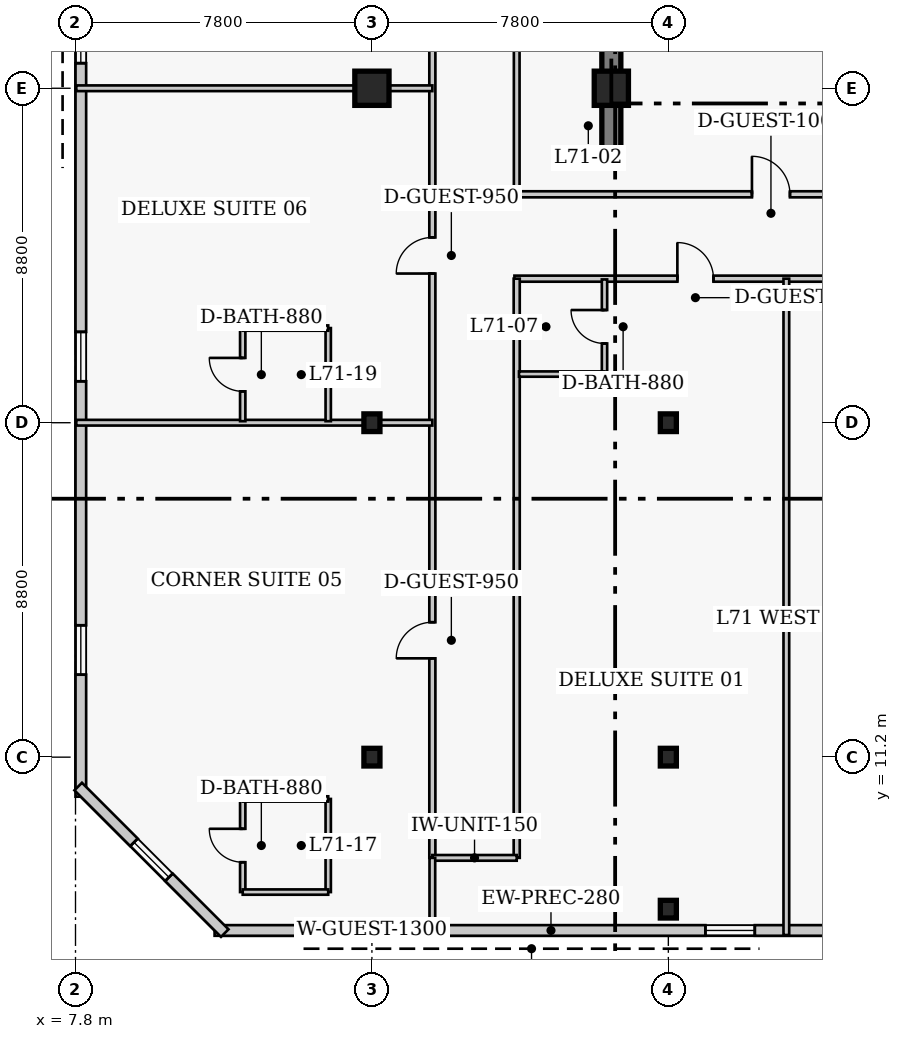
"""IFC4 building model, lengths in metres.
Left out: names, types, materials, properties, quantities, classifications, styles, units other than length and angle.
Written with IfcOpenShell. Run it as: python <this file> out.ifc"""

import sys

from ifc_helpers import new_model, si_unit, direction, frame, frame_2d, origin, origin_2d, place, context, subcontext, project, spatial, rectangle, i_section, extrude, element, fill, save


model = new_model("IFC4")
c1 = context("Model", 3, precision=1e-05, world=origin(), true_north=direction((0.0, 1.0)))
c2 = subcontext(c1, "Body", "Model", "MODEL_VIEW")
j1 = project(units=[si_unit("LENGTHUNIT", "METRE"), si_unit("PLANEANGLEUNIT", "RADIAN")], contexts=[c1])
p1 = place(None, origin())
s1 = spatial("IfcSite", under=j1, at=p1, CompositionType="ELEMENT")
p2 = place(p1, origin())
s2 = spatial("IfcBuilding", under=s1, at=p2, CompositionType="ELEMENT")
p3 = place(p2, frame((0.0, 0.0, 285.4)))
s3 = spatial("IfcBuildingStorey", under=s2, at=p3, CompositionType="ELEMENT", Elevation=285.4)
p4 = place(p3, frame((21.9, 27.05, 0.0), z_axis=(0.0, 0.0, 1.0), x_axis=(0.0, 1.0, 0.0)))
e1 = element("IfcWall", 1, at=p4, inside=s3, PredefinedType="SHEAR", context=c2, shape_type="SweptSolid", body=[
    extrude(rectangle(XDim=13.52, YDim=0.5, at=frame_2d((6.76, 0.0))), origin(), (0.0, 0.0, 1.0), 4.0),
])
for number, where, z_axis, x_axis in (
    (2, (15.6, 11.2, 0.0), (0.0, 0.0, 1.0), (1.0, 0.0, 0.0)),
    (3, (15.6, 20.0, 0.0), (0.0, 0.0, 1.0), (1.0, 0.0, 0.0)),
):
    element("IfcColumn", number, at=place(p3, frame(where, z_axis=z_axis, x_axis=x_axis)), inside=s3, PredefinedType="COLUMN", context=c2, shape_type="SweptSolid", body=[
        extrude(i_section(OverallWidth=0.422, OverallDepth=0.465, WebThickness=0.045, FlangeThickness=0.073, FilletRadius=0.017, at=origin_2d()), origin(), (0.0, 0.0, 1.0), 4.0),
    ])
p5 = place(p3, frame((15.6, 28.8, 0.0), z_axis=(0.0, 0.0, 1.0), x_axis=(1.0, 0.0, 0.0)))
e4 = element("IfcColumn", 4, at=p5, inside=s3, PredefinedType="COLUMN", context=c2, shape_type="SweptSolid", body=[
    extrude(rectangle(XDim=0.9, YDim=0.9, at=origin_2d()), origin(), (0.0, 0.0, 1.0), 4.0),
])
for number, where, z_axis, x_axis in (
    (5, (23.4, 11.2, 0.0), (0.0, 0.0, 1.0), (1.0, 0.0, 0.0)),
    (6, (23.4, 20.0, 0.0), (0.0, 0.0, 1.0), (1.0, 0.0, 0.0)),
):
    element("IfcColumn", number, at=place(p3, frame(where, z_axis=z_axis, x_axis=x_axis)), inside=s3, PredefinedType="COLUMN", context=c2, shape_type="SweptSolid", body=[
        extrude(i_section(OverallWidth=0.422, OverallDepth=0.465, WebThickness=0.045, FlangeThickness=0.073, FilletRadius=0.017, at=origin_2d()), origin(), (0.0, 0.0, 1.0), 4.0),
    ])
p6 = place(p3, frame((21.9, 28.8, 0.0), z_axis=(0.0, 0.0, 1.0), x_axis=(1.0, 0.0, 0.0)))
e7 = element("IfcColumn", 7, at=p6, inside=s3, PredefinedType="COLUMN", context=c2, shape_type="SweptSolid", body=[
    extrude(rectangle(XDim=0.9, YDim=0.9, at=origin_2d()), origin(), (0.0, 0.0, 1.0), 4.0),
])
p7 = place(p3, frame((23.4, 7.2, 0.0), z_axis=(0.0, 0.0, 1.0), x_axis=(1.0, 0.0, 0.0)))
e8 = element("IfcColumn", 8, at=p7, inside=s3, PredefinedType="COLUMN", context=c2, shape_type="SweptSolid", body=[
    extrude(i_section(OverallWidth=0.422, OverallDepth=0.465, WebThickness=0.045, FlangeThickness=0.073, FilletRadius=0.017, at=origin_2d()), origin(), (0.0, 0.0, 1.0), 4.0),
])
p8 = place(p3, frame((11.46, 6.64, 0.0), z_axis=(0.0, 0.0, 1.0), x_axis=(1.0, 0.0, 0.0)))
e9 = element("IfcWall", 9, at=p8, inside=s3, PredefinedType="SOLIDWALL", context=c2, shape_type="SweptSolid", body=[
    extrude(rectangle(XDim=24.83, YDim=0.28, at=frame_2d((12.415, 0.0))), origin(), (0.0, 0.0, 1.0), 3.76),
])
p9 = place(p8, frame((3.488, 0.0, 0.85)))
e10 = element("IfcOpeningElement", 10, at=p9, cuts=e9, PredefinedType="OPENING", context=c2, shape_type="SweptSolid", body=[
    extrude(rectangle(XDim=1.3, YDim=1.7, at=frame_2d((0.65, 0.85))), frame((0.0, 0.15, 0.0), z_axis=(0.0, -1.0, 0.0), x_axis=(1.0, 0.0, 0.0)), (0.0, 0.0, 1.0), 0.3),
])
p10 = place(p8, frame((12.915, 0.0, 0.85)))
e11 = element("IfcOpeningElement", 11, at=p10, cuts=e9, PredefinedType="OPENING", context=c2, shape_type="SweptSolid", body=[
    extrude(rectangle(XDim=1.3, YDim=1.7, at=frame_2d((0.65, 0.85))), frame((0.0, 0.15, 0.0), z_axis=(0.0, -1.0, 0.0), x_axis=(1.0, 0.0, 0.0)), (0.0, 0.0, 1.0), 0.3),
])
p11 = place(p8, frame((20.692, 0.0, 0.85)))
e12 = element("IfcOpeningElement", 12, at=p11, cuts=e9, PredefinedType="OPENING", context=c2, shape_type="SweptSolid", body=[
    extrude(rectangle(XDim=1.3, YDim=1.7, at=frame_2d((0.65, 0.85))), frame((0.0, 0.15, 0.0), z_axis=(0.0, -1.0, 0.0), x_axis=(1.0, 0.0, 0.0)), (0.0, 0.0, 1.0), 0.3),
])
p12 = place(p3, frame((7.94, 41.04, 0.0), z_axis=(0.0, 0.0, 1.0), x_axis=(0.0, -1.0, 0.0)))
e13 = element("IfcWall", 13, at=p12, inside=s3, PredefinedType="SOLIDWALL", context=c2, shape_type="SweptSolid", body=[
    extrude(rectangle(XDim=30.88, YDim=0.28, at=frame_2d((15.44, 0.0))), origin(), (0.0, 0.0, 1.0), 3.76),
])
p13 = place(p12, frame((3.21, 0.0, 0.85)))
e14 = element("IfcOpeningElement", 14, at=p13, cuts=e13, PredefinedType="OPENING", context=c2, shape_type="SweptSolid", body=[
    extrude(rectangle(XDim=1.3, YDim=1.7, at=frame_2d((0.65, 0.85))), frame((0.0, 0.15, 0.0), z_axis=(0.0, -1.0, 0.0), x_axis=(1.0, 0.0, 0.0)), (0.0, 0.0, 1.0), 0.3),
])
p14 = place(p12, frame((10.28, 0.0, 0.85)))
e15 = element("IfcOpeningElement", 15, at=p14, cuts=e13, PredefinedType="OPENING", context=c2, shape_type="SweptSolid", body=[
    extrude(rectangle(XDim=1.3, YDim=1.7, at=frame_2d((0.65, 0.85))), frame((0.0, 0.15, 0.0), z_axis=(0.0, -1.0, 0.0), x_axis=(1.0, 0.0, 0.0)), (0.0, 0.0, 1.0), 0.3),
])
p15 = place(p12, frame((18.65, 0.0, 0.85)))
e16 = element("IfcOpeningElement", 16, at=p15, cuts=e13, PredefinedType="OPENING", context=c2, shape_type="SweptSolid", body=[
    extrude(rectangle(XDim=1.3, YDim=1.7, at=frame_2d((0.65, 0.85))), frame((0.0, 0.15, 0.0), z_axis=(0.0, -1.0, 0.0), x_axis=(1.0, 0.0, 0.0)), (0.0, 0.0, 1.0), 0.3),
])
p16 = place(p12, frame((26.37, 0.0, 0.85)))
e17 = element("IfcOpeningElement", 17, at=p16, cuts=e13, PredefinedType="OPENING", context=c2, shape_type="SweptSolid", body=[
    extrude(rectangle(XDim=1.3, YDim=1.7, at=frame_2d((0.65, 0.85))), frame((0.0, 0.15, 0.0), z_axis=(0.0, -1.0, 0.0), x_axis=(1.0, 0.0, 0.0)), (0.0, 0.0, 1.0), 0.3),
])
p17 = place(p3, frame((7.871, 10.427, 0.0), z_axis=(0.0, 0.0, 1.0), x_axis=(0.707129162587, -0.707084399077, 0.0)))
e18 = element("IfcWall", 18, at=p17, inside=s3, PredefinedType="SOLIDWALL", context=c2, shape_type="SweptSolid", body=[
    extrude(rectangle(XDim=5.454, YDim=0.28, at=frame_2d((2.727, 0.0))), origin(), (0.0, 0.0, 1.0), 3.76),
])
p18 = place(p17, frame((2.077, 0.0, 0.85)))
e19 = element("IfcOpeningElement", 19, at=p18, cuts=e18, PredefinedType="OPENING", context=c2, shape_type="SweptSolid", body=[
    extrude(rectangle(XDim=1.3, YDim=1.7, at=frame_2d((0.65, 0.85))), frame((0.0, 0.15, 0.0), z_axis=(0.0, -1.0, 0.0), x_axis=(1.0, 0.0, 0.0)), (0.0, 0.0, 1.0), 0.3),
])
p19 = place(p3, frame((19.35, 26.01, 0.0), z_axis=(0.0, 0.0, 1.0), x_axis=(1.0, 0.0, 0.0)))
e20 = element("IfcWall", 20, at=p19, inside=s3, PredefinedType="PARTITIONING", context=c2, shape_type="SweptSolid", body=[
    extrude(rectangle(XDim=14.3, YDim=0.16, at=frame_2d((7.15, 0.0))), origin(), (0.0, 0.0, 1.0), 3.76),
])
p20 = place(p19, frame((6.25, 0.0, 0.0)))
e21 = element("IfcOpeningElement", 21, at=p20, cuts=e20, PredefinedType="OPENING", context=c2, shape_type="SweptSolid", body=[
    extrude(rectangle(XDim=1.0, YDim=2.15, at=frame_2d((0.5, 1.075))), frame((0.0, 0.09, 0.0), z_axis=(0.0, -1.0, 0.0), x_axis=(1.0, 0.0, 0.0)), (0.0, 0.0, 1.0), 0.18),
])
p21 = place(p3, frame((19.35, 23.79, 0.0), z_axis=(0.0, 0.0, 1.0), x_axis=(1.0, 0.0, 0.0)))
e22 = element("IfcWall", 22, at=p21, inside=s3, PredefinedType="PARTITIONING", context=c2, shape_type="SweptSolid", body=[
    extrude(rectangle(XDim=16.45, YDim=0.16, at=frame_2d((8.225, 0.0))), origin(), (0.0, 0.0, 1.0), 3.76),
])
p22 = place(p21, frame((4.288, 0.0, 0.0)))
e23 = element("IfcOpeningElement", 23, at=p22, cuts=e22, PredefinedType="OPENING", context=c2, shape_type="SweptSolid", body=[
    extrude(rectangle(XDim=0.95, YDim=2.1, at=frame_2d((0.475, 1.05))), frame((0.0, 0.09, 0.0), z_axis=(0.0, -1.0, 0.0), x_axis=(1.0, 0.0, 0.0)), (0.0, 0.0, 1.0), 0.18),
])
p23 = place(p21, frame((11.302, 0.0, 0.0)))
e24 = element("IfcOpeningElement", 24, at=p23, cuts=e22, PredefinedType="OPENING", context=c2, shape_type="SweptSolid", body=[
    extrude(rectangle(XDim=1.0, YDim=2.15, at=frame_2d((0.5, 1.075))), frame((0.0, 0.09, 0.0), z_axis=(0.0, -1.0, 0.0), x_axis=(1.0, 0.0, 0.0)), (0.0, 0.0, 1.0), 0.18),
])
p24 = place(p3, frame((17.19, 8.55, 0.0), z_axis=(0.0, 0.0, 1.0), x_axis=(0.0, 1.0, 0.0)))
e25 = element("IfcWall", 25, at=p24, inside=s3, PredefinedType="PARTITIONING", context=c2, shape_type="SweptSolid", body=[
    extrude(rectangle(XDim=32.1, YDim=0.16, at=frame_2d((16.05, 0.0))), origin(), (0.0, 0.0, 1.0), 3.76),
])
p25 = place(p24, frame((5.25, 0.0, 0.0)))
e26 = element("IfcOpeningElement", 26, at=p25, cuts=e25, PredefinedType="OPENING", context=c2, shape_type="SweptSolid", body=[
    extrude(rectangle(XDim=0.95, YDim=2.1, at=frame_2d((0.475, 1.05))), frame((0.0, 0.09, 0.0), z_axis=(0.0, -1.0, 0.0), x_axis=(1.0, 0.0, 0.0)), (0.0, 0.0, 1.0), 0.18),
])
p26 = place(p24, frame((15.375, 0.0, 0.0)))
e27 = element("IfcOpeningElement", 27, at=p26, cuts=e25, PredefinedType="OPENING", context=c2, shape_type="SweptSolid", body=[
    extrude(rectangle(XDim=0.95, YDim=2.1, at=frame_2d((0.475, 1.05))), frame((0.0, 0.09, 0.0), z_axis=(0.0, -1.0, 0.0), x_axis=(1.0, 0.0, 0.0)), (0.0, 0.0, 1.0), 0.18),
])
p27 = place(p24, frame((23.075, 0.0, 0.0)))
e28 = element("IfcOpeningElement", 28, at=p27, cuts=e25, PredefinedType="OPENING", context=c2, shape_type="SweptSolid", body=[
    extrude(rectangle(XDim=0.95, YDim=2.1, at=frame_2d((0.475, 1.05))), frame((0.0, 0.09, 0.0), z_axis=(0.0, -1.0, 0.0), x_axis=(1.0, 0.0, 0.0)), (0.0, 0.0, 1.0), 0.18),
])
p28 = place(p24, frame((27.4, 0.0, 0.0)))
e29 = element("IfcOpeningElement", 29, at=p28, cuts=e25, PredefinedType="OPENING", context=c2, shape_type="SweptSolid", body=[
    extrude(rectangle(XDim=1.0, YDim=2.15, at=frame_2d((0.5, 1.075))), frame((0.0, 0.09, 0.0), z_axis=(0.0, -1.0, 0.0), x_axis=(1.0, 0.0, 0.0)), (0.0, 0.0, 1.0), 0.18),
])
p29 = place(p3, frame((19.41, 8.55, 0.0), z_axis=(0.0, 0.0, 1.0), x_axis=(0.0, 1.0, 0.0)))
e30 = element("IfcWall", 30, at=p29, inside=s3, PredefinedType="PARTITIONING", context=c2, shape_type="SweptSolid", body=[
    extrude(rectangle(XDim=15.24, YDim=0.16, at=frame_2d((7.62, 0.0))), origin(), (0.0, 0.0, 1.0), 3.356),
])
p30 = place(p3, frame((17.19, 8.55, 0.0), z_axis=(0.0, 0.0, 1.0), x_axis=(1.0, 0.0, 0.0)))
e31 = element("IfcWall", 31, at=p30, inside=s3, PredefinedType="PARTITIONING", context=c2, shape_type="SweptSolid", body=[
    extrude(rectangle(XDim=2.22, YDim=0.15, at=frame_2d((1.11, 0.0))), origin(), (0.0, 0.0, 1.0), 3.76),
])
p31 = place(p3, frame((19.41, 26.01, 0.0), z_axis=(0.0, 0.0, 1.0), x_axis=(0.0, 1.0, 0.0)))
e32 = element("IfcWall", 32, at=p31, inside=s3, PredefinedType="PARTITIONING", context=c2, shape_type="SweptSolid", body=[
    extrude(rectangle(XDim=6.79, YDim=0.15, at=frame_2d((3.395, 0.0))), origin(), (0.0, 0.0, 1.0), 3.76),
])
p32 = place(p3, frame((21.72, 21.28, 0.0), z_axis=(0.0, 0.0, 1.0), x_axis=(0.0, 1.0, 0.0)))
e33 = element("IfcWall", 33, at=p32, inside=s3, PredefinedType="PLUMBINGWALL", context=c2, shape_type="SweptSolid", body=[
    extrude(rectangle(XDim=2.49, YDim=0.14, at=frame_2d((1.245, 0.0))), origin(), (0.0, 0.0, 1.0), 3.76),
])
p33 = place(p32, frame((0.805, 0.0, 0.0)))
e34 = element("IfcOpeningElement", 34, at=p33, cuts=e33, PredefinedType="OPENING", context=c2, shape_type="SweptSolid", body=[
    extrude(rectangle(XDim=0.88, YDim=2.05, at=frame_2d((0.44, 1.025))), frame((0.0, 0.08, 0.0), z_axis=(0.0, -1.0, 0.0), x_axis=(1.0, 0.0, 0.0)), (0.0, 0.0, 1.0), 0.16),
])
p34 = place(p3, frame((19.47, 21.28, 0.0), z_axis=(0.0, 0.0, 1.0), x_axis=(1.0, 0.0, 0.0)))
e35 = element("IfcWall", 35, at=p34, inside=s3, PredefinedType="PLUMBINGWALL", context=c2, shape_type="SweptSolid", body=[
    extrude(rectangle(XDim=2.25, YDim=0.14, at=frame_2d((1.125, 0.0))), origin(), (0.0, 0.0, 1.0), 3.76),
])
p35 = place(p3, frame((26.505, 6.52, 0.0), z_axis=(0.0, 0.0, 1.0), x_axis=(0.0, 1.0, 0.0)))
e36 = element("IfcWall", 36, at=p35, inside=s3, PredefinedType="PARTITIONING", context=c2, shape_type="SweptSolid", body=[
    extrude(rectangle(XDim=17.27, YDim=0.15, at=frame_2d((8.635, 0.0))), origin(), (0.0, 0.0, 1.0), 3.76),
])
p36 = place(p3, frame((17.19, 6.52, 0.0), z_axis=(0.0, 0.0, 1.0), x_axis=(0.0, 1.0, 0.0)))
e37 = element("IfcWall", 37, at=p36, inside=s3, PredefinedType="PARTITIONING", context=c2, shape_type="SweptSolid", body=[
    extrude(rectangle(XDim=2.03, YDim=0.15, at=frame_2d((1.015, 0.0))), origin(), (0.0, 0.0, 1.0), 3.76),
])
p37 = place(p3, frame((12.2, 7.65, 0.0), z_axis=(0.0, 0.0, 1.0), x_axis=(0.0, 1.0, 0.0)))
e38 = element("IfcWall", 38, at=p37, inside=s3, PredefinedType="PLUMBINGWALL", context=c2, shape_type="SweptSolid", body=[
    extrude(rectangle(XDim=2.45, YDim=0.14, at=frame_2d((1.225, 0.0))), origin(), (0.0, 0.0, 1.0), 3.76),
])
p38 = place(p37, frame((0.785, 0.0, 0.0)))
e39 = element("IfcOpeningElement", 39, at=p38, cuts=e38, PredefinedType="OPENING", context=c2, shape_type="SweptSolid", body=[
    extrude(rectangle(XDim=0.88, YDim=2.05, at=frame_2d((0.44, 1.025))), frame((0.0, 0.08, 0.0), z_axis=(0.0, -1.0, 0.0), x_axis=(1.0, 0.0, 0.0)), (0.0, 0.0, 1.0), 0.16),
])
p39 = place(p3, frame((14.45, 7.65, 0.0), z_axis=(0.0, 0.0, 1.0), x_axis=(0.0, 1.0, 0.0)))
e40 = element("IfcWall", 40, at=p39, inside=s3, PredefinedType="PLUMBINGWALL", context=c2, shape_type="SweptSolid", body=[
    extrude(rectangle(XDim=2.45, YDim=0.14, at=frame_2d((1.225, 0.0))), origin(), (0.0, 0.0, 1.0), 3.76),
])
for number, where, z_axis, x_axis in (
    (41, (12.2, 7.65, 0.0), (0.0, 0.0, 1.0), (1.0, 0.0, 0.0)),
    (42, (12.2, 10.1, 0.0), (0.0, 0.0, 1.0), (1.0, 0.0, 0.0)),
):
    element("IfcWall", number, at=place(p3, frame(where, z_axis=z_axis, x_axis=x_axis)), inside=s3, PredefinedType="PLUMBINGWALL", context=c2, shape_type="SweptSolid", body=[
        extrude(rectangle(XDim=2.25, YDim=0.14, at=frame_2d((1.125, 0.0))), origin(), (0.0, 0.0, 1.0), 3.76),
    ])
p40 = place(p3, frame((7.82, 20.0, 0.0), z_axis=(0.0, 0.0, 1.0), x_axis=(1.0, 0.0, 0.0)))
e43 = element("IfcWall", 43, at=p40, inside=s3, PredefinedType="PARTITIONING", context=c2, shape_type="SweptSolid", body=[
    extrude(rectangle(XDim=9.37, YDim=0.15, at=frame_2d((4.685, 0.0))), origin(), (0.0, 0.0, 1.0), 3.064),
])
p41 = place(p3, frame((12.2, 20.04, 0.0), z_axis=(0.0, 0.0, 1.0), x_axis=(0.0, 1.0, 0.0)))
e44 = element("IfcWall", 44, at=p41, inside=s3, PredefinedType="PLUMBINGWALL", context=c2, shape_type="SweptSolid", body=[
    extrude(rectangle(XDim=2.45, YDim=0.14, at=frame_2d((1.225, 0.0))), origin(), (0.0, 0.0, 1.0), 3.76),
])
p42 = place(p41, frame((0.785, 0.0, 0.0)))
e45 = element("IfcOpeningElement", 45, at=p42, cuts=e44, PredefinedType="OPENING", context=c2, shape_type="SweptSolid", body=[
    extrude(rectangle(XDim=0.88, YDim=2.05, at=frame_2d((0.44, 1.025))), frame((0.0, 0.08, 0.0), z_axis=(0.0, -1.0, 0.0), x_axis=(1.0, 0.0, 0.0)), (0.0, 0.0, 1.0), 0.16),
])
p43 = place(p3, frame((14.45, 20.04, 0.0), z_axis=(0.0, 0.0, 1.0), x_axis=(0.0, 1.0, 0.0)))
e46 = element("IfcWall", 46, at=p43, inside=s3, PredefinedType="PLUMBINGWALL", context=c2, shape_type="SweptSolid", body=[
    extrude(rectangle(XDim=2.45, YDim=0.14, at=frame_2d((1.225, 0.0))), origin(), (0.0, 0.0, 1.0), 3.76),
])
p44 = place(p3, frame((12.2, 22.49, 0.0), z_axis=(0.0, 0.0, 1.0), x_axis=(1.0, 0.0, 0.0)))
e47 = element("IfcWall", 47, at=p44, inside=s3, PredefinedType="PLUMBINGWALL", context=c2, shape_type="SweptSolid", body=[
    extrude(rectangle(XDim=2.25, YDim=0.14, at=frame_2d((1.125, 0.0))), origin(), (0.0, 0.0, 1.0), 3.76),
])
p45 = place(p3, frame((7.82, 28.8, 0.0), z_axis=(0.0, 0.0, 1.0), x_axis=(1.0, 0.0, 0.0)))
e48 = element("IfcWall", 48, at=p45, inside=s3, PredefinedType="PARTITIONING", context=c2, shape_type="SweptSolid", body=[
    extrude(rectangle(XDim=9.37, YDim=0.15, at=frame_2d((4.685, 0.0))), origin(), (0.0, 0.0, 1.0), 3.064),
])
p46 = place(p9, origin())
e49 = element("IfcWindow", 49, at=p46, inside=s3, PartitioningType="SINGLE_PANEL", PredefinedType="WINDOW", context=c2, shape_type="SweptSolid", body=[
    extrude(rectangle(XDim=1.3, YDim=1.7, at=frame_2d((0.65, 0.85))), frame((0.0, 0.03, 0.0), z_axis=(0.0, -1.0, 0.0), x_axis=(1.0, 0.0, 0.0)), (0.0, 0.0, 1.0), 0.06),
])
fill(e10, e49)
p47 = place(p10, origin())
e50 = element("IfcWindow", 50, at=p47, inside=s3, PartitioningType="SINGLE_PANEL", PredefinedType="WINDOW", context=c2, shape_type="SweptSolid", body=[
    extrude(rectangle(XDim=1.3, YDim=1.7, at=frame_2d((0.65, 0.85))), frame((0.0, 0.03, 0.0), z_axis=(0.0, -1.0, 0.0), x_axis=(1.0, 0.0, 0.0)), (0.0, 0.0, 1.0), 0.06),
])
fill(e11, e50)
p48 = place(p14, origin())
e51 = element("IfcWindow", 51, at=p48, inside=s3, PartitioningType="SINGLE_PANEL", PredefinedType="WINDOW", context=c2, shape_type="SweptSolid", body=[
    extrude(rectangle(XDim=1.3, YDim=1.7, at=frame_2d((0.65, 0.85))), frame((0.0, 0.03, 0.0), z_axis=(0.0, -1.0, 0.0), x_axis=(1.0, 0.0, 0.0)), (0.0, 0.0, 1.0), 0.06),
])
fill(e15, e51)
p49 = place(p15, origin())
e52 = element("IfcWindow", 52, at=p49, inside=s3, PartitioningType="SINGLE_PANEL", PredefinedType="WINDOW", context=c2, shape_type="SweptSolid", body=[
    extrude(rectangle(XDim=1.3, YDim=1.7, at=frame_2d((0.65, 0.85))), frame((0.0, 0.03, 0.0), z_axis=(0.0, -1.0, 0.0), x_axis=(1.0, 0.0, 0.0)), (0.0, 0.0, 1.0), 0.06),
])
fill(e16, e52)
p50 = place(p16, origin())
e53 = element("IfcWindow", 53, at=p50, inside=s3, PartitioningType="SINGLE_PANEL", PredefinedType="WINDOW", context=c2, shape_type="SweptSolid", body=[
    extrude(rectangle(XDim=1.3, YDim=1.7, at=frame_2d((0.65, 0.85))), frame((0.0, 0.03, 0.0), z_axis=(0.0, -1.0, 0.0), x_axis=(1.0, 0.0, 0.0)), (0.0, 0.0, 1.0), 0.06),
])
fill(e17, e53)
p51 = place(p18, origin())
e54 = element("IfcWindow", 54, at=p51, inside=s3, PartitioningType="SINGLE_PANEL", PredefinedType="WINDOW", context=c2, shape_type="SweptSolid", body=[
    extrude(rectangle(XDim=1.3, YDim=1.7, at=frame_2d((0.65, 0.85))), frame((0.0, 0.03, 0.0), z_axis=(0.0, -1.0, 0.0), x_axis=(1.0, 0.0, 0.0)), (0.0, 0.0, 1.0), 0.06),
])
fill(e19, e54)
p52 = place(p20, origin())
e55 = element("IfcDoor", 55, at=p52, inside=s3, OperationType="SINGLE_SWING_LEFT", PredefinedType="DOOR", context=c2, shape_type="SweptSolid", body=[
    extrude(rectangle(XDim=1.0, YDim=2.15, at=frame_2d((0.5, 1.075))), frame((0.0, 0.025, 0.0), z_axis=(0.0, -1.0, 0.0), x_axis=(1.0, 0.0, 0.0)), (0.0, 0.0, 1.0), 0.05),
])
fill(e21, e55)
p53 = place(p33, origin())
e56 = element("IfcDoor", 56, at=p53, inside=s3, OperationType="SINGLE_SWING_RIGHT", PredefinedType="DOOR", context=c2, shape_type="SweptSolid", body=[
    extrude(rectangle(XDim=0.88, YDim=2.05, at=frame_2d((0.44, 1.025))), frame((0.0, 0.025, 0.0), z_axis=(0.0, -1.0, 0.0), x_axis=(1.0, 0.0, 0.0)), (0.0, 0.0, 1.0), 0.05),
])
fill(e34, e56)
p54 = place(p22, origin())
e57 = element("IfcDoor", 57, at=p54, inside=s3, OperationType="SINGLE_SWING_LEFT", PredefinedType="DOOR", context=c2, shape_type="SweptSolid", body=[
    extrude(rectangle(XDim=0.95, YDim=2.1, at=frame_2d((0.475, 1.05))), frame((0.0, 0.025, 0.0), z_axis=(0.0, -1.0, 0.0), x_axis=(1.0, 0.0, 0.0)), (0.0, 0.0, 1.0), 0.05),
])
fill(e23, e57)
p55 = place(p38, origin())
e58 = element("IfcDoor", 58, at=p55, inside=s3, OperationType="SINGLE_SWING_RIGHT", PredefinedType="DOOR", context=c2, shape_type="SweptSolid", body=[
    extrude(rectangle(XDim=0.88, YDim=2.05, at=frame_2d((0.44, 1.025))), frame((0.0, 0.025, 0.0), z_axis=(0.0, -1.0, 0.0), x_axis=(1.0, 0.0, 0.0)), (0.0, 0.0, 1.0), 0.05),
])
fill(e39, e58)
p56 = place(p25, origin())
e59 = element("IfcDoor", 59, at=p56, inside=s3, OperationType="SINGLE_SWING_LEFT", PredefinedType="DOOR", context=c2, shape_type="SweptSolid", body=[
    extrude(rectangle(XDim=0.95, YDim=2.1, at=frame_2d((0.475, 1.05))), frame((0.0, 0.025, 0.0), z_axis=(0.0, -1.0, 0.0), x_axis=(1.0, 0.0, 0.0)), (0.0, 0.0, 1.0), 0.05),
])
fill(e26, e59)
p57 = place(p42, origin())
e60 = element("IfcDoor", 60, at=p57, inside=s3, OperationType="SINGLE_SWING_RIGHT", PredefinedType="DOOR", context=c2, shape_type="SweptSolid", body=[
    extrude(rectangle(XDim=0.88, YDim=2.05, at=frame_2d((0.44, 1.025))), frame((0.0, 0.025, 0.0), z_axis=(0.0, -1.0, 0.0), x_axis=(1.0, 0.0, 0.0)), (0.0, 0.0, 1.0), 0.05),
])
fill(e45, e60)
p58 = place(p26, origin())
e61 = element("IfcDoor", 61, at=p58, inside=s3, OperationType="SINGLE_SWING_LEFT", PredefinedType="DOOR", context=c2, shape_type="SweptSolid", body=[
    extrude(rectangle(XDim=0.95, YDim=2.1, at=frame_2d((0.475, 1.05))), frame((0.0, 0.025, 0.0), z_axis=(0.0, -1.0, 0.0), x_axis=(1.0, 0.0, 0.0)), (0.0, 0.0, 1.0), 0.05),
])
fill(e27, e61)
save(model, sys.argv[1])
